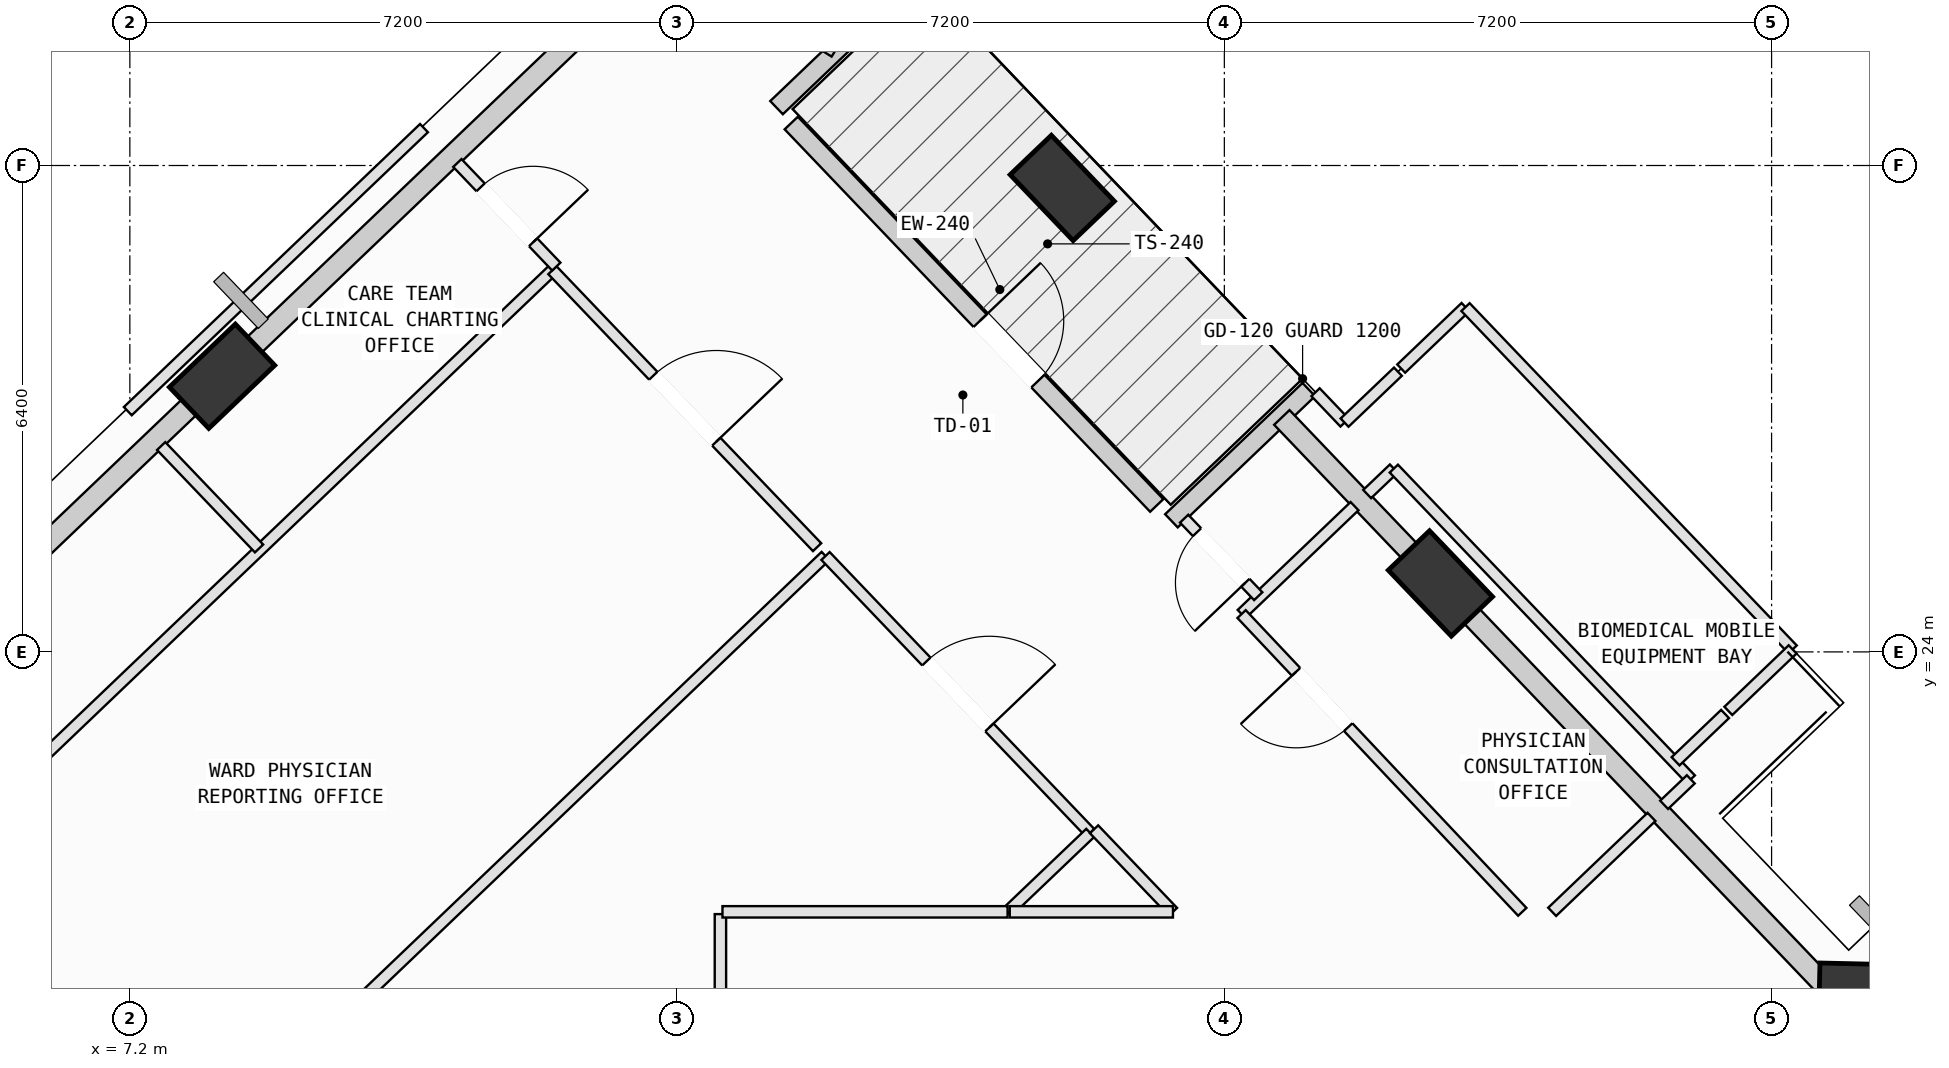
"""IFC4 building model, lengths in metres.
Left out: names, types, materials, properties, quantities, classifications, styles, units other than length and angle.
Written with IfcOpenShell. Run it as: python <this file> out.ifc"""

import sys

from ifc_helpers import new_model, si_unit, direction, frame, frame_2d, origin, origin_2d, place, context, subcontext, project, spatial, rectangle, extrude, element, fill, save


model = new_model("IFC4")
c1 = context("Model", 3, precision=1e-05, world=origin(), true_north=direction((0.0, 1.0)))
c2 = subcontext(c1, "Body", "Model", "MODEL_VIEW")
j1 = project(units=[si_unit("LENGTHUNIT", "METRE"), si_unit("PLANEANGLEUNIT", "RADIAN")], contexts=[c1])
p1 = place(None, origin())
s1 = spatial("IfcSite", under=j1, at=p1, CompositionType="ELEMENT")
p2 = place(p1, origin())
s2 = spatial("IfcBuilding", under=s1, at=p2, CompositionType="ELEMENT")
p3 = place(p2, frame((0.0, 0.0, 211.2)))
s3 = spatial("IfcBuildingStorey", under=s2, at=p3, CompositionType="ELEMENT", Elevation=211.2)
p4 = place(p3, frame((29.798, 19.298, 0.019), z_axis=(0.022938777207, -0.015578741739, 0.999615483727), x_axis=(-0.813978214162, 0.580233554641, 0.027721633021)))
e1 = element("IfcColumn", 1, at=p4, inside=s3, PredefinedType="COLUMN", context=c2, shape_type="SweptSolid", body=[
    extrude(rectangle(XDim=1.2, YDim=0.75, at=origin_2d()), origin(), (0.0, 0.0, 1.0), 3.98),
])
p5 = place(p3, frame((24.443, 24.901, 0.029), z_axis=(-0.000122920319, -0.037920918504, 0.999280735745), x_axis=(-0.688536987797, 0.724682823454, 0.027415722252)))
e2 = element("IfcColumn", 2, at=p5, inside=s3, PredefinedType="COLUMN", context=c2, shape_type="SweptSolid", body=[
    extrude(rectangle(XDim=1.2, YDim=0.75, at=origin_2d()), origin(), (0.0, 0.0, 1.0), 3.972),
])
p6 = place(p3, frame((19.468, 30.104, 0.046), z_axis=(-0.021454067114, -0.058690436473, 0.998045668129), x_axis=(-0.401158864072, 0.914893751158, 0.045177315857)))
e3 = element("IfcColumn", 3, at=p6, inside=s3, PredefinedType="COLUMN", context=c2, shape_type="SweptSolid", body=[
    extrude(rectangle(XDim=1.2, YDim=0.75, at=origin_2d()), origin(), (0.0, 0.0, 1.0), 3.96),
])
p7 = place(p3, frame((8.413, 27.627, 0.074), z_axis=(-0.010828197195, -0.10395069307, 0.994523505783), x_axis=(0.790264048258, 0.608497317732, 0.072206290191)))
e4 = element("IfcColumn", 4, at=p7, inside=s3, PredefinedType="COLUMN", context=c2, shape_type="SweptSolid", body=[
    extrude(rectangle(XDim=1.2, YDim=0.75, at=origin_2d()), origin(), (0.0, 0.0, 1.0), 3.946),
])
p8 = place(p3, frame((15.902, 30.959, 0.0), z_axis=(0.0, 0.0, 1.0), x_axis=(0.690876921508, -0.722972391816, 0.0)))
e5 = element("IfcWall", 5, at=p8, inside=s3, PredefinedType="SOLIDWALL", context=c2, shape_type="SweptSolid", body=[
    extrude(rectangle(XDim=6.96, YDim=0.24, at=frame_2d((3.48, 0.0))), origin(), (0.0, 0.0, 1.0), 3.265),
])
p9 = place(p8, frame((3.597, 0.0, 0.0)))
e6 = element("IfcOpeningElement", 6, at=p9, cuts=e5, PredefinedType="OPENING", context=c2, shape_type="SweptSolid", body=[
    extrude(rectangle(XDim=1.1, YDim=2.15, at=frame_2d((0.55, 1.075))), frame((0.0, 0.13, 0.0), z_axis=(0.0, -1.0, 0.0), x_axis=(1.0, 0.0, 0.0)), (0.0, 0.0, 1.0), 0.26),
])
for number, where, z_axis, x_axis in (
    (7, (20.904, 25.725, 0.0), (0.0, 0.0, 1.0), (0.723, 0.691, 0.0)),
    (8, (17.516, 32.889, 0.0), (0.0, 0.0, 1.0), (-0.723, -0.691, 0.0)),
):
    element("IfcWall", number, at=place(p3, frame(where, z_axis=z_axis, x_axis=x_axis)), inside=s3, PredefinedType="SOLIDWALL", context=c2, shape_type="SweptSolid", body=[
        extrude(rectangle(XDim=2.5, YDim=0.24, at=frame_2d((1.25, 0.0))), origin(), (0.0, 0.0, 1.0), 3.265),
    ])
p10 = place(p3, frame((30.09, 19.579, 0.0), z_axis=(0.0, 0.0, 1.0), x_axis=(0.722961207673, 0.690888625033, 0.0)))
e9 = element("IfcWall", 9, at=p10, inside=s3, PredefinedType="SOLIDWALL", context=c2, shape_type="SweptSolid", body=[
    extrude(rectangle(XDim=6.158, YDim=0.28, at=frame_2d((3.079, 0.0))), origin(), (0.0, 0.0, 1.0), 2.765),
])
p11 = place(p10, frame((3.669, 0.0, 0.75)))
e10 = element("IfcOpeningElement", 10, at=p11, cuts=e9, PredefinedType="OPENING", context=c2, shape_type="SweptSolid", body=[
    extrude(rectangle(XDim=1.2, YDim=1.75, at=frame_2d((0.6, 0.875))), frame((0.0, 0.15, 0.0), z_axis=(0.0, -1.0, 0.0), x_axis=(1.0, 0.0, 0.0)), (0.0, 0.0, 1.0), 0.3),
])
p12 = place(p3, frame((24.753, 24.577, 0.0), z_axis=(0.0, 0.0, 1.0), x_axis=(0.69090790135, -0.722942786015, 0.0)))
e11 = element("IfcWall", 11, at=p12, inside=s3, PredefinedType="SOLIDWALL", context=c2, shape_type="SweptSolid", body=[
    extrude(rectangle(XDim=6.958, YDim=0.28, at=frame_2d((3.479, 0.0))), origin(), (0.0, 0.0, 1.0), 3.245),
])
p13 = place(p3, frame((22.356, 27.085, 0.0), z_axis=(0.0, 0.0, 1.0), x_axis=(0.690850366561, -0.722997766956, 0.0)))
e12 = element("IfcWall", 12, at=p13, inside=s3, PredefinedType="SOLIDWALL", context=c2, shape_type="SweptSolid", body=[
    extrude(rectangle(XDim=2.681, YDim=0.28, at=frame_2d((1.34, 0.0))), origin(), (0.0, 0.0, 1.0), 3.245),
])
p14 = place(p3, frame((14.668, 33.097, 0.0), z_axis=(0.0, 0.0, 1.0), x_axis=(0.848820554676, -0.528681062607, 0.0)))
e13 = element("IfcWall", 13, at=p14, inside=s3, PredefinedType="SOLIDWALL", context=c2, shape_type="SweptSolid", body=[
    extrude(rectangle(XDim=2.166, YDim=0.28, at=frame_2d((1.083, 0.0))), origin(), (0.0, 0.0, 1.0), 3.245),
])
p15 = place(p3, frame((8.568, 27.782, 0.0), z_axis=(0.0, 0.0, 1.0), x_axis=(0.722966997623, 0.69088256625, 0.0)))
e14 = element("IfcWall", 14, at=p15, inside=s3, PredefinedType="SOLIDWALL", context=c2, shape_type="SweptSolid", body=[
    extrude(rectangle(XDim=7.434, YDim=0.28, at=frame_2d((3.717, 0.0))), origin(), (0.0, 0.0, 1.0), 3.265),
])
p16 = place(p3, frame((2.617, 22.095, 0.0), z_axis=(0.0, 0.0, 1.0), x_axis=(0.722973311948, 0.690875958629, 0.0)))
e15 = element("IfcWall", 15, at=p16, inside=s3, PredefinedType="SOLIDWALL", context=c2, shape_type="SweptSolid", body=[
    extrude(rectangle(XDim=7.485, YDim=0.28, at=frame_2d((3.742, 0.0))), origin(), (0.0, 0.0, 1.0), 3.265),
])
p17 = place(p3, frame((14.97, 20.55, 0.0), z_axis=(0.0, 0.0, 1.0), x_axis=(0.0, -1.0, 0.0)))
e16 = element("IfcWall", 16, at=p17, inside=s3, PredefinedType="PARTITIONING", context=c2, shape_type="SweptSolid", body=[
    extrude(rectangle(XDim=2.32, YDim=0.15, at=frame_2d((1.16, 0.0))), origin(), (0.0, 0.0, 1.0), 3.78),
])
p18 = place(p3, frame((5.374, 14.771, 0.0), z_axis=(0.0, 0.0, 1.0), x_axis=(0.722993367921, 0.690854970267, 0.0)))
e17 = element("IfcWall", 17, at=p18, inside=s3, PredefinedType="PARTITIONING", context=c2, shape_type="SweptSolid", body=[
    extrude(rectangle(XDim=15.186, YDim=0.15, at=frame_2d((7.593, 0.0))), origin(), (0.0, 0.0, 1.0), 3.78),
])
p19 = place(p3, frame((16.353, 25.262, 0.0), z_axis=(0.0, 0.0, 1.0), x_axis=(0.690842016715, -0.723005745441, 0.0)))
e18 = element("IfcWall", 18, at=p19, inside=s3, PredefinedType="PARTITIONING", context=c2, shape_type="SweptSolid", body=[
    extrude(rectangle(XDim=5.04, YDim=0.15, at=frame_2d((2.52, 0.0))), origin(), (0.0, 0.0, 1.0), 3.78),
])
p20 = place(p19, frame((1.92, 0.0, 0.0)))
e19 = element("IfcOpeningElement", 19, at=p20, cuts=e18, PredefinedType="OPENING", context=c2, shape_type="SweptSolid", body=[
    extrude(rectangle(XDim=1.2, YDim=2.15, at=frame_2d((0.6, 1.075))), frame((0.0, 0.085, 0.0), z_axis=(0.0, -1.0, 0.0), x_axis=(1.0, 0.0, 0.0)), (0.0, 0.0, 1.0), 0.17),
])
p21 = place(p3, frame((19.835, 21.618, 0.0), z_axis=(0.0, 0.0, 1.0), x_axis=(-0.723244890559, -0.690591650891, 0.0)))
e20 = element("IfcWall", 20, at=p21, inside=s3, PredefinedType="PARTITIONING", context=c2, shape_type="SweptSolid", body=[
    extrude(rectangle(XDim=1.503, YDim=0.15, at=frame_2d((0.751, 0.0))), origin(), (0.0, 0.0, 1.0), 3.78),
])
p22 = place(p3, frame((18.748, 20.58, 0.0), z_axis=(0.0, 0.0, 1.0), x_axis=(-1.0, 0.0, 0.0)))
e21 = element("IfcWall", 21, at=p22, inside=s3, PredefinedType="PARTITIONING", context=c2, shape_type="SweptSolid", body=[
    extrude(rectangle(XDim=3.751, YDim=0.15, at=frame_2d((1.875, 0.0))), origin(), (0.0, 0.0, 1.0), 3.78),
])
p23 = place(p3, frame((2.949, 19.646, 0.0), z_axis=(0.0, 0.0, 1.0), x_axis=(0.722954347525, 0.690895803573, 0.0)))
e22 = element("IfcWall", 22, at=p23, inside=s3, PredefinedType="PARTITIONING", context=c2, shape_type="SweptSolid", body=[
    extrude(rectangle(XDim=13.571, YDim=0.15, at=frame_2d((6.785, 0.0))), origin(), (0.0, 0.0, 1.0), 3.78),
])
p24 = place(p3, frame((12.76, 29.022, 0.0), z_axis=(0.0, 0.0, 1.0), x_axis=(0.690842016715, -0.723005745441, 0.0)))
e23 = element("IfcWall", 23, at=p24, inside=s3, PredefinedType="PARTITIONING", context=c2, shape_type="SweptSolid", body=[
    extrude(rectangle(XDim=5.04, YDim=0.15, at=frame_2d((2.52, 0.0))), origin(), (0.0, 0.0, 1.0), 3.78),
])
p25 = place(p24, frame((1.92, 0.0, 0.0)))
e24 = element("IfcOpeningElement", 24, at=p25, cuts=e23, PredefinedType="OPENING", context=c2, shape_type="SweptSolid", body=[
    extrude(rectangle(XDim=1.2, YDim=2.15, at=frame_2d((0.6, 1.075))), frame((0.0, 0.085, 0.0), z_axis=(0.0, -1.0, 0.0), x_axis=(1.0, 0.0, 0.0)), (0.0, 0.0, 1.0), 0.17),
])
p26 = place(p3, frame((21.827, 24.498, 0.0), z_axis=(0.0, 0.0, 1.0), x_axis=(0.723018377462, 0.69082879634, 0.0)))
e25 = element("IfcWall", 25, at=p26, inside=s3, PredefinedType="PARTITIONING", context=c2, shape_type="SweptSolid", body=[
    extrude(rectangle(XDim=2.055, YDim=0.15, at=frame_2d((1.028, 0.0))), origin(), (0.0, 0.0, 1.0), 3.78),
])
p27 = place(p3, frame((23.479, 26.077, 0.0), z_axis=(0.0, 0.0, 1.0), x_axis=(0.723264188429, 0.690571439995, 0.0)))
e26 = element("IfcWall", 26, at=p27, inside=s3, PredefinedType="PARTITIONING", context=c2, shape_type="SweptSolid", body=[
    extrude(rectangle(XDim=0.485, YDim=0.15, at=frame_2d((0.243, 0.0))), origin(), (0.0, 0.0, 1.0), 3.78),
])
p28 = place(p3, frame((23.83, 26.412, 0.0), z_axis=(0.0, 0.0, 1.0), x_axis=(0.690821667132, -0.723025189202, 0.0)))
e27 = element("IfcWall", 27, at=p28, inside=s3, PredefinedType="PARTITIONING", context=c2, shape_type="SweptSolid", body=[
    extrude(rectangle(XDim=5.656, YDim=0.15, at=frame_2d((2.828, 0.0))), origin(), (0.0, 0.0, 1.0), 3.78),
])
p29 = place(p3, frame((27.737, 22.323, 0.0), z_axis=(0.0, 0.0, 1.0), x_axis=(-0.7235154417, -0.690308196114, 0.0)))
e28 = element("IfcWall", 28, at=p29, inside=s3, PredefinedType="PARTITIONING", context=c2, shape_type="SweptSolid", body=[
    extrude(rectangle(XDim=0.485, YDim=0.15, at=frame_2d((0.243, 0.0))), origin(), (0.0, 0.0, 1.0), 3.78),
])
p30 = place(p3, frame((27.22, 21.829, 0.0), z_axis=(0.0, 0.0, 1.0), x_axis=(-0.722929228479, -0.690922087222, 0.0)))
e29 = element("IfcWall", 29, at=p30, inside=s3, PredefinedType="PARTITIONING", context=c2, shape_type="SweptSolid", body=[
    extrude(rectangle(XDim=1.808, YDim=0.15, at=frame_2d((0.904, 0.0))), origin(), (0.0, 0.0, 1.0), 3.78),
])
p31 = place(p3, frame((25.52, 20.58, 0.0), z_axis=(0.0, 0.0, 1.0), x_axis=(-0.685917530826, 0.727679284373, 0.0)))
e30 = element("IfcWall", 30, at=p31, inside=s3, PredefinedType="PARTITIONING", context=c2, shape_type="SweptSolid", body=[
    extrude(rectangle(XDim=5.384, YDim=0.15, at=frame_2d((2.692, 0.0))), origin(), (0.0, 0.0, 1.0), 3.78),
])
p32 = place(p31, frame((3.339, 0.0, 0.0)))
e31 = element("IfcOpeningElement", 31, at=p32, cuts=e30, PredefinedType="OPENING", context=c2, shape_type="SweptSolid", body=[
    extrude(rectangle(XDim=1.0, YDim=2.12, at=frame_2d((0.5, 1.06))), frame((0.0, 0.085, 0.0), z_axis=(0.0, -1.0, 0.0), x_axis=(1.0, 0.0, 0.0)), (0.0, 0.0, 1.0), 0.17),
])
p33 = place(p3, frame((8.9, 25.361, 0.0), z_axis=(0.0, 0.0, 1.0), x_axis=(-0.69081517616, 0.723031391011, 0.0)))
e32 = element("IfcWall", 32, at=p33, inside=s3, PredefinedType="PARTITIONING", context=c2, shape_type="SweptSolid", body=[
    extrude(rectangle(XDim=1.864, YDim=0.15, at=frame_2d((0.932, 0.0))), origin(), (0.0, 0.0, 1.0), 2.765),
])
p34 = place(p3, frame((7.173, 27.168, 0.0), z_axis=(0.0, 0.0, 1.0), x_axis=(0.722958515641, 0.690891442024, 0.0)))
e33 = element("IfcWall", 33, at=p34, inside=s3, PredefinedType="PARTITIONING", context=c2, shape_type="SweptSolid", body=[
    extrude(rectangle(XDim=5.39, YDim=0.15, at=frame_2d((2.695, 0.0))), origin(), (0.0, 0.0, 1.0), 3.78),
])
p35 = place(p3, frame((11.509, 30.433, 0.0), z_axis=(0.0, 0.0, 1.0), x_axis=(0.690731383484, -0.723111440838, 0.0)))
e34 = element("IfcWall", 34, at=p35, inside=s3, PredefinedType="PARTITIONING", context=c2, shape_type="SweptSolid", body=[
    extrude(rectangle(XDim=1.885, YDim=0.15, at=frame_2d((0.942, 0.0))), origin(), (0.0, 0.0, 1.0), 3.78),
])
p36 = place(p35, frame((0.442, 0.0, 0.0)))
e35 = element("IfcOpeningElement", 35, at=p36, cuts=e34, PredefinedType="OPENING", context=c2, shape_type="SweptSolid", body=[
    extrude(rectangle(XDim=1.0, YDim=2.12, at=frame_2d((0.5, 1.06))), frame((0.0, 0.085, 0.0), z_axis=(0.0, -1.0, 0.0), x_axis=(1.0, 0.0, 0.0)), (0.0, 0.0, 1.0), 0.17),
])
p37 = place(p3, frame((19.886, 21.666, 0.0), z_axis=(0.0, 0.0, 1.0), x_axis=(0.691001224956, -0.722853586219, 0.0)))
e36 = element("IfcWall", 36, at=p37, inside=s3, PredefinedType="PARTITIONING", context=c2, shape_type="SweptSolid", body=[
    extrude(rectangle(XDim=1.502, YDim=0.15, at=frame_2d((0.751, 0.0))), origin(), (0.0, 0.0, 1.0), 3.78),
])
p38 = place(p3, frame((20.924, 20.58, 0.0), z_axis=(0.0, 0.0, 1.0), x_axis=(-1.0, 0.0, 0.0)))
e37 = element("IfcWall", 37, at=p38, inside=s3, PredefinedType="PARTITIONING", context=c2, shape_type="SweptSolid", body=[
    extrude(rectangle(XDim=2.147, YDim=0.15, at=frame_2d((1.073, 0.0))), origin(), (0.0, 0.0, 1.0), 3.78),
])
p39 = place(p3, frame((22.046, 24.733, 0.0), z_axis=(0.0, 0.0, 1.0), x_axis=(-0.690920076878, 0.722931149811, 0.0)))
e38 = element("IfcWall", 38, at=p39, inside=s3, PredefinedType="PARTITIONING", context=c2, shape_type="SweptSolid", body=[
    extrude(rectangle(XDim=1.411, YDim=0.15, at=frame_2d((0.706, 0.0))), origin(), (0.0, 0.0, 1.0), 3.78),
])
p40 = place(p39, frame((0.246, 0.0, 0.0)))
e39 = element("IfcOpeningElement", 39, at=p40, cuts=e38, PredefinedType="OPENING", context=c2, shape_type="SweptSolid", body=[
    extrude(rectangle(XDim=0.92, YDim=2.1, at=frame_2d((0.46, 1.05))), frame((0.0, 0.085, 0.0), z_axis=(0.0, -1.0, 0.0), x_axis=(1.0, 0.0, 0.0)), (0.0, 0.0, 1.0), 0.17),
])
p41 = place(p3, frame((22.8, 27.417, 0.0), z_axis=(0.0, 0.0, 1.0), x_axis=(0.690580756179, -0.723255293237, 0.0)))
e40 = element("IfcWall", 40, at=p41, inside=s3, PredefinedType="PARTITIONING", context=c2, shape_type="SweptSolid", body=[
    extrude(rectangle(XDim=0.553, YDim=0.15, at=frame_2d((0.276, 0.0))), origin(), (0.0, 0.0, 1.0), 3.78),
])
p42 = place(p3, frame((23.182, 27.017, 0.0), z_axis=(0.0, 0.0, 1.0), x_axis=(0.7235154417, 0.690308196114, 0.0)))
e41 = element("IfcWall", 41, at=p42, inside=s3, PredefinedType="PARTITIONING", context=c2, shape_type="SweptSolid", body=[
    extrude(rectangle(XDim=0.97, YDim=0.15, at=frame_2d((0.485, 0.0))), origin(), (0.0, 0.0, 1.0), 3.78),
])
p43 = place(p3, frame((28.188, 23.183, 0.0), z_axis=(0.0, 0.0, 1.0), x_axis=(-0.722924471625, -0.690927064404, 0.0)))
e42 = element("IfcWall", 42, at=p43, inside=s3, PredefinedType="PARTITIONING", context=c2, shape_type="SweptSolid", body=[
    extrude(rectangle(XDim=0.9, YDim=0.15, at=frame_2d((0.45, 0.0))), origin(), (0.0, 0.0, 1.0), 3.78),
])
p44 = place(p3, frame((23.927, 27.728, 0.0), z_axis=(0.0, 0.0, 1.0), x_axis=(0.72267809254, 0.691184761523, 0.0)))
e43 = element("IfcWall", 43, at=p44, inside=s3, PredefinedType="PARTITIONING", context=c2, shape_type="SweptSolid", body=[
    extrude(rectangle(XDim=1.171, YDim=0.15, at=frame_2d((0.585, 0.0))), origin(), (0.0, 0.0, 1.0), 3.78),
])
p45 = place(p3, frame((24.773, 28.537, 0.0), z_axis=(0.0, 0.0, 1.0), x_axis=(0.690856861123, -0.722991561112, 0.0)))
e44 = element("IfcWall", 44, at=p45, inside=s3, PredefinedType="PARTITIONING", context=c2, shape_type="SweptSolid", body=[
    extrude(rectangle(XDim=6.23, YDim=0.15, at=frame_2d((3.115, 0.0))), origin(), (0.0, 0.0, 1.0), 3.78),
])
p46 = place(p3, frame((29.077, 24.033, 0.0), z_axis=(0.0, 0.0, 1.0), x_axis=(-0.722782278471, -0.691075811998, 0.0)))
e45 = element("IfcWall", 45, at=p46, inside=s3, PredefinedType="PARTITIONING", context=c2, shape_type="SweptSolid", body=[
    extrude(rectangle(XDim=1.17, YDim=0.15, at=frame_2d((0.585, 0.0))), origin(), (0.0, 0.0, 1.0), 3.78),
])
p47 = place(p9, origin())
e46 = element("IfcDoor", 46, at=p47, inside=s3, OperationType="SINGLE_SWING_LEFT", PredefinedType="DOOR", context=c2, shape_type="SweptSolid", body=[
    extrude(rectangle(XDim=1.1, YDim=2.15, at=frame_2d((0.55, 1.075))), frame((0.0, 0.025, 0.0), z_axis=(0.0, -1.0, 0.0), x_axis=(1.0, 0.0, 0.0)), (0.0, 0.0, 1.0), 0.05),
])
fill(e6, e46)
p48 = place(p20, origin())
e47 = element("IfcDoor", 47, at=p48, inside=s3, OperationType="SINGLE_SWING_RIGHT", PredefinedType="DOOR", context=c2, shape_type="SweptSolid", body=[
    extrude(rectangle(XDim=1.2, YDim=2.15, at=frame_2d((0.6, 1.075))), frame((0.0, 0.025, 0.0), z_axis=(0.0, -1.0, 0.0), x_axis=(1.0, 0.0, 0.0)), (0.0, 0.0, 1.0), 0.05),
])
fill(e19, e47)
p49 = place(p25, origin())
e48 = element("IfcDoor", 48, at=p49, inside=s3, OperationType="SINGLE_SWING_RIGHT", PredefinedType="DOOR", context=c2, shape_type="SweptSolid", body=[
    extrude(rectangle(XDim=1.2, YDim=2.15, at=frame_2d((0.6, 1.075))), frame((0.0, 0.025, 0.0), z_axis=(0.0, -1.0, 0.0), x_axis=(1.0, 0.0, 0.0)), (0.0, 0.0, 1.0), 0.05),
])
fill(e24, e48)
p50 = place(p32, origin())
e49 = element("IfcDoor", 49, at=p50, inside=s3, OperationType="SINGLE_SWING_RIGHT", PredefinedType="DOOR", context=c2, shape_type="SweptSolid", body=[
    extrude(rectangle(XDim=1.0, YDim=2.12, at=frame_2d((0.5, 1.06))), frame((0.0, 0.025, 0.0), z_axis=(0.0, -1.0, 0.0), x_axis=(1.0, 0.0, 0.0)), (0.0, 0.0, 1.0), 0.05),
])
fill(e31, e49)
p51 = place(p36, origin())
e50 = element("IfcDoor", 50, at=p51, inside=s3, OperationType="SINGLE_SWING_RIGHT", PredefinedType="DOOR", context=c2, shape_type="SweptSolid", body=[
    extrude(rectangle(XDim=1.0, YDim=2.12, at=frame_2d((0.5, 1.06))), frame((0.0, 0.025, 0.0), z_axis=(0.0, -1.0, 0.0), x_axis=(1.0, 0.0, 0.0)), (0.0, 0.0, 1.0), 0.05),
])
fill(e35, e50)
p52 = place(p40, origin())
e51 = element("IfcDoor", 51, at=p52, inside=s3, OperationType="SINGLE_SWING_LEFT", PredefinedType="DOOR", context=c2, shape_type="SweptSolid", body=[
    extrude(rectangle(XDim=0.92, YDim=2.1, at=frame_2d((0.46, 1.05))), frame((0.0, 0.025, 0.0), z_axis=(0.0, -1.0, 0.0), x_axis=(1.0, 0.0, 0.0)), (0.0, 0.0, 1.0), 0.05),
])
fill(e39, e51)
save(model, sys.argv[1])
